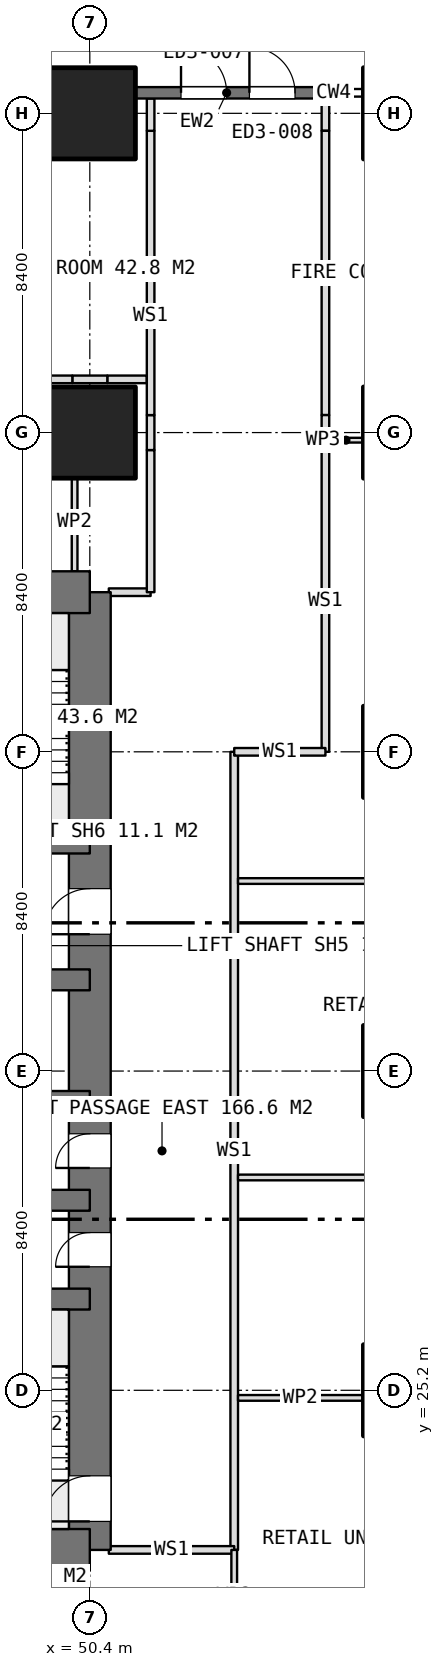
"""IFC4 building model, lengths in metres.
Left out: names, types, materials, properties, quantities, classifications, styles, units other than length and angle.
Written with IfcOpenShell. Run it as: python <this file> out.ifc"""

import sys

from ifc_helpers import new_model, si_unit, direction, frame, frame_2d, origin, origin_2d, place, context, subcontext, project, spatial, rectangle, extrude, element, fill, save


model = new_model("IFC4")
c1 = context("Model", 3, precision=1e-05, world=origin(), true_north=direction((0.0, 1.0)))
c2 = subcontext(c1, "Body", "Model", "MODEL_VIEW")
j1 = project(units=[si_unit("LENGTHUNIT", "METRE"), si_unit("PLANEANGLEUNIT", "RADIAN")], contexts=[c1])
p1 = place(None, origin())
s1 = spatial("IfcSite", under=j1, at=p1, CompositionType="ELEMENT")
p2 = place(p1, origin())
s2 = spatial("IfcBuilding", under=s1, at=p2, CompositionType="ELEMENT")
p3 = place(p2, origin())
s3 = spatial("IfcBuildingStorey", under=s2, at=p3, CompositionType="ELEMENT", Elevation=0.0)
for number, where, z_axis, x_axis in (
    (1, (40.0, 21.0, 0.0), (0.0, 0.0, 1.0), (1.0, 0.0, 0.0)),
    (2, (40.0, 46.2, 0.0), (0.0, 0.0, 1.0), (1.0, 0.0, 0.0)),
):
    element("IfcWall", number, at=place(p3, frame(where, z_axis=z_axis, x_axis=x_axis)), inside=s3, PredefinedType="SHEAR", context=c2, shape_type="SweptSolid", body=[
        extrude(rectangle(XDim=10.4, YDim=1.1, at=frame_2d((5.2, 0.0))), origin(), (0.0, 0.0, 1.0), 5.4),
    ])
p4 = place(p3, frame((50.4, 21.0, 0.0), z_axis=(0.0, 0.0, 1.0), x_axis=(0.0, 1.0, 0.0)))
e3 = element("IfcWall", 3, at=p4, inside=s3, PredefinedType="SHEAR", context=c2, shape_type="SweptSolid", body=[
    extrude(rectangle(XDim=25.2, YDim=1.1, at=frame_2d((12.6, 0.0))), origin(), (0.0, 0.0, 1.0), 5.4),
])
p5 = place(p4, frame((16.2, 0.0, 0.0)))
e4 = element("IfcOpeningElement", 4, at=p5, cuts=e3, PredefinedType="OPENING", context=c2, shape_type="SweptSolid", body=[
    extrude(rectangle(XDim=1.2, YDim=2.1, at=frame_2d((0.6, 1.05))), frame((0.0, 0.56, 0.0), z_axis=(0.0, -1.0, 0.0), x_axis=(1.0, 0.0, 0.0)), (0.0, 0.0, 1.0), 1.12),
])
p6 = place(p4, frame((10.05, 0.0, 0.0)))
e5 = element("IfcOpeningElement", 5, at=p6, cuts=e3, PredefinedType="OPENING", context=c2, shape_type="SweptSolid", body=[
    extrude(rectangle(XDim=0.9, YDim=2.1, at=frame_2d((0.45, 1.05))), frame((0.0, 0.56, 0.0), z_axis=(0.0, -1.0, 0.0), x_axis=(1.0, 0.0, 0.0)), (0.0, 0.0, 1.0), 1.12),
])
p7 = place(p4, frame((7.45, 0.0, 0.0)))
e6 = element("IfcOpeningElement", 6, at=p7, cuts=e3, PredefinedType="OPENING", context=c2, shape_type="SweptSolid", body=[
    extrude(rectangle(XDim=0.9, YDim=2.1, at=frame_2d((0.45, 1.05))), frame((0.0, 0.56, 0.0), z_axis=(0.0, -1.0, 0.0), x_axis=(1.0, 0.0, 0.0)), (0.0, 0.0, 1.0), 1.12),
])
p8 = place(p4, frame((0.75, 0.0, 0.0)))
e7 = element("IfcOpeningElement", 7, at=p8, cuts=e3, PredefinedType="OPENING", context=c2, shape_type="SweptSolid", body=[
    extrude(rectangle(XDim=1.2, YDim=2.1, at=frame_2d((0.6, 1.05))), frame((0.0, 0.56, 0.0), z_axis=(0.0, -1.0, 0.0), x_axis=(1.0, 0.0, 0.0)), (0.0, 0.0, 1.0), 1.12),
])
for number, where, z_axis, x_axis in (
    (8, (43.8, 27.6, 0.0), (0.0, 0.0, 1.0), (1.0, 0.0, 0.0)),
    (9, (43.8, 30.2, 0.0), (0.0, 0.0, 1.0), (1.0, 0.0, 0.0)),
    (10, (43.8, 32.8, 0.0), (0.0, 0.0, 1.0), (1.0, 0.0, 0.0)),
):
    element("IfcWall", number, at=place(p3, frame(where, z_axis=z_axis, x_axis=x_axis)), inside=s3, PredefinedType="SHEAR", context=c2, shape_type="SweptSolid", body=[
        extrude(rectangle(XDim=6.6, YDim=0.55, at=frame_2d((3.3, 0.0))), origin(), (0.0, 0.0, 1.0), 5.4),
    ])
p9 = place(p3, frame((43.8, 36.0, 0.0), z_axis=(0.0, 0.0, 1.0), x_axis=(1.0, 0.0, 0.0)))
e11 = element("IfcWall", 11, at=p9, inside=s3, PredefinedType="SHEAR", context=c2, shape_type="SweptSolid", body=[
    extrude(rectangle(XDim=6.6, YDim=0.55, at=frame_2d((3.3, 0.0))), origin(), (0.0, 0.0, 1.0), 5.4),
])
p10 = place(p9, frame((2.65, 0.0, 0.0)))
e12 = element("IfcOpeningElement", 12, at=p10, cuts=e11, PredefinedType="OPENING", context=c2, shape_type="SweptSolid", body=[
    extrude(rectangle(XDim=1.3, YDim=2.1, at=frame_2d((0.65, 1.05))), frame((0.0, 0.285, 0.0), z_axis=(0.0, -1.0, 0.0), x_axis=(1.0, 0.0, 0.0)), (0.0, 0.0, 1.0), 0.57),
])
p11 = place(p3, frame((43.8, 39.6, 0.0), z_axis=(0.0, 0.0, 1.0), x_axis=(1.0, 0.0, 0.0)))
e13 = element("IfcWall", 13, at=p11, inside=s3, PredefinedType="SHEAR", context=c2, shape_type="SweptSolid", body=[
    extrude(rectangle(XDim=6.6, YDim=0.55, at=frame_2d((3.3, 0.0))), origin(), (0.0, 0.0, 1.0), 5.4),
])
p12 = place(p11, frame((0.475, 0.0, 0.0)))
e14 = element("IfcOpeningElement", 14, at=p12, cuts=e13, PredefinedType="OPENING", context=c2, shape_type="SweptSolid", body=[
    extrude(rectangle(XDim=1.2, YDim=2.1, at=frame_2d((0.6, 1.05))), frame((0.0, 0.285, 0.0), z_axis=(0.0, -1.0, 0.0), x_axis=(1.0, 0.0, 0.0)), (0.0, 0.0, 1.0), 0.57),
])
for number, where, z_axis, x_axis in (
    (15, (50.4, 50.4, 0.0), (0.0, 0.0, 1.0), (1.0, 0.0, 0.0)),
    (16, (50.4, 58.8, 0.0), (0.0, 0.0, 1.0), (1.0, 0.0, 0.0)),
):
    element("IfcColumn", number, at=place(p3, frame(where, z_axis=z_axis, x_axis=x_axis)), inside=s3, PredefinedType="COLUMN", context=c2, shape_type="SweptSolid", body=[
        extrude(rectangle(XDim=2.4, YDim=2.4, at=origin_2d()), origin(), (0.0, 0.0, 1.0), 5.4),
    ])
p13 = place(p3, frame((51.601, 59.34, 0.0), z_axis=(0.0, 0.0, 1.0), x_axis=(1.0, 0.0, 0.0)))
e17 = element("IfcWall", 17, at=p13, inside=s3, PredefinedType="SOLIDWALL", context=c2, shape_type="SweptSolid", body=[
    extrude(rectangle(XDim=4.799, YDim=0.3, at=frame_2d((2.399, 0.0))), origin(), (0.0, 0.0, 1.0), 3.3),
])
p14 = place(p13, frame((2.999, 0.0, 0.0)))
e18 = element("IfcOpeningElement", 18, at=p14, cuts=e17, PredefinedType="OPENING", context=c2, shape_type="SweptSolid", body=[
    extrude(rectangle(XDim=1.2, YDim=2.4, at=frame_2d((0.6, 1.2))), frame((0.0, 0.16, 0.0), z_axis=(0.0, -1.0, 0.0), x_axis=(1.0, 0.0, 0.0)), (0.0, 0.0, 1.0), 0.32),
])
p15 = place(p13, frame((1.199, 0.0, 0.0)))
e19 = element("IfcOpeningElement", 19, at=p15, cuts=e17, PredefinedType="OPENING", context=c2, shape_type="SweptSolid", body=[
    extrude(rectangle(XDim=1.2, YDim=2.4, at=frame_2d((0.6, 1.2))), frame((0.0, 0.16, 0.0), z_axis=(0.0, -1.0, 0.0), x_axis=(1.0, 0.0, 0.0)), (0.0, 0.0, 1.0), 0.32),
])
p16 = place(p3, frame((40.325, 49.4, 0.0), z_axis=(0.0, 0.0, 1.0), x_axis=(1.0, 0.0, 0.0)))
e20 = element("IfcWall", 20, at=p16, inside=s3, PredefinedType="PARTITIONING", context=c2, shape_type="SweptSolid", body=[
    extrude(rectangle(XDim=9.75, YDim=0.15, at=frame_2d((4.875, 0.0))), origin(), (0.0, 0.0, 1.0), 5.1),
])
p17 = place(p16, frame((4.375, 0.0, 0.0)))
e21 = element("IfcOpeningElement", 21, at=p17, cuts=e20, PredefinedType="OPENING", context=c2, shape_type="SweptSolid", body=[
    extrude(rectangle(XDim=1.0, YDim=2.1, at=frame_2d((0.5, 1.05))), frame((0.0, 0.085, 0.0), z_axis=(0.0, -1.0, 0.0), x_axis=(1.0, 0.0, 0.0)), (0.0, 0.0, 1.0), 0.17),
])
for number, where, z_axis, x_axis in (
    (22, (50.0, 46.75, 0.0), (0.0, 0.0, 1.0), (0.0, 1.0, 0.0)),
    (23, (50.0, 17.875, 0.0), (0.0, 0.0, 1.0), (0.0, 1.0, 0.0)),
):
    element("IfcWall", number, at=place(p3, frame(where, z_axis=z_axis, x_axis=x_axis)), inside=s3, PredefinedType="PARTITIONING", context=c2, shape_type="SweptSolid", body=[
        extrude(rectangle(XDim=2.575, YDim=0.15, at=frame_2d((1.288, 0.0))), origin(), (0.0, 0.0, 1.0), 5.1),
    ])
p18 = place(p3, frame((52.0, 46.2, 0.0), z_axis=(0.0, 0.0, 1.0), x_axis=(0.0, 1.0, 0.0)))
e24 = element("IfcWall", 24, at=p18, inside=s3, PredefinedType="PARTITIONING", context=c2, shape_type="SweptSolid", body=[
    extrude(rectangle(XDim=3.74, YDim=0.2, at=frame_2d((1.87, 0.0))), origin(), (0.0, 0.0, 1.0), 5.1),
])
p19 = place(p3, frame((52.0, 49.94, 0.0), z_axis=(0.0, 0.0, 1.0), x_axis=(0.0, 1.0, 0.0)))
e25 = element("IfcWall", 25, at=p19, inside=s3, PredefinedType="PARTITIONING", context=c2, shape_type="SweptSolid", body=[
    extrude(rectangle(XDim=0.92, YDim=0.2, at=frame_2d((0.46, 0.0))), origin(), (0.0, 0.0, 1.0), 3.3),
])
p20 = place(p3, frame((52.0, 50.86, 0.0), z_axis=(0.0, 0.0, 1.0), x_axis=(0.0, 1.0, 0.0)))
e26 = element("IfcWall", 26, at=p20, inside=s3, PredefinedType="PARTITIONING", context=c2, shape_type="SweptSolid", body=[
    extrude(rectangle(XDim=7.48, YDim=0.2, at=frame_2d((3.74, 0.0))), origin(), (0.0, 0.0, 1.0), 5.1),
])
p21 = place(p3, frame((52.0, 58.34, 0.0), z_axis=(0.0, 0.0, 1.0), x_axis=(0.0, 1.0, 0.0)))
e27 = element("IfcWall", 27, at=p21, inside=s3, PredefinedType="PARTITIONING", context=c2, shape_type="SweptSolid", body=[
    extrude(rectangle(XDim=0.85, YDim=0.2, at=frame_2d((0.425, 0.0))), origin(), (0.0, 0.0, 1.0), 3.3),
])
p22 = place(p3, frame((56.6, 59.29, 0.0), z_axis=(0.0, 0.0, 1.0), x_axis=(0.0, -1.0, 0.0)))
e28 = element("IfcWall", 28, at=p22, inside=s3, PredefinedType="PARTITIONING", context=c2, shape_type="SweptSolid", body=[
    extrude(rectangle(XDim=0.95, YDim=0.2, at=frame_2d((0.475, 0.0))), origin(), (0.0, 0.0, 1.0), 3.3),
])
p23 = place(p3, frame((56.6, 58.34, 0.0), z_axis=(0.0, 0.0, 1.0), x_axis=(0.0, -1.0, 0.0)))
e29 = element("IfcWall", 29, at=p23, inside=s3, PredefinedType="PARTITIONING", context=c2, shape_type="SweptSolid", body=[
    extrude(rectangle(XDim=7.48, YDim=0.2, at=frame_2d((3.74, 0.0))), origin(), (0.0, 0.0, 1.0), 5.1),
])
p24 = place(p3, frame((56.6, 50.86, 0.0), z_axis=(0.0, 0.0, 1.0), x_axis=(0.0, -1.0, 0.0)))
e30 = element("IfcWall", 30, at=p24, inside=s3, PredefinedType="PARTITIONING", context=c2, shape_type="SweptSolid", body=[
    extrude(rectangle(XDim=0.92, YDim=0.2, at=frame_2d((0.46, 0.0))), origin(), (0.0, 0.0, 1.0), 3.3),
])
p25 = place(p3, frame((56.6, 49.94, 0.0), z_axis=(0.0, 0.0, 1.0), x_axis=(0.0, -1.0, 0.0)))
e31 = element("IfcWall", 31, at=p25, inside=s3, PredefinedType="PARTITIONING", context=c2, shape_type="SweptSolid", body=[
    extrude(rectangle(XDim=7.94, YDim=0.2, at=frame_2d((3.97, 0.0))), origin(), (0.0, 0.0, 1.0), 5.1),
])
p26 = place(p3, frame((56.6, 42.0, 0.0), z_axis=(0.0, 0.0, 1.0), x_axis=(-1.0, 0.0, 0.0)))
e32 = element("IfcWall", 32, at=p26, inside=s3, PredefinedType="PARTITIONING", context=c2, shape_type="SweptSolid", body=[
    extrude(rectangle(XDim=2.4, YDim=0.2, at=frame_2d((1.2, 0.0))), origin(), (0.0, 0.0, 1.0), 5.1),
])
p27 = place(p3, frame((54.2, 42.0, 0.0), z_axis=(0.0, 0.0, 1.0), x_axis=(0.0, -1.0, 0.0)))
e33 = element("IfcWall", 33, at=p27, inside=s3, PredefinedType="PARTITIONING", context=c2, shape_type="SweptSolid", body=[
    extrude(rectangle(XDim=21.0, YDim=0.2, at=frame_2d((10.5, 0.0))), origin(), (0.0, 0.0, 1.0), 5.1),
])
p28 = place(p3, frame((54.2, 21.0, 0.0), z_axis=(0.0, 0.0, 1.0), x_axis=(-1.0, 0.0, 0.0)))
e34 = element("IfcWall", 34, at=p28, inside=s3, PredefinedType="PARTITIONING", context=c2, shape_type="SweptSolid", body=[
    extrude(rectangle(XDim=3.3, YDim=0.2, at=frame_2d((1.65, 0.0))), origin(), (0.0, 0.0, 1.0), 5.1),
])
p29 = place(p3, frame((50.9, 46.2, 0.0), z_axis=(0.0, 0.0, 1.0), x_axis=(1.0, 0.0, 0.0)))
e35 = element("IfcWall", 35, at=p29, inside=s3, PredefinedType="PARTITIONING", context=c2, shape_type="SweptSolid", body=[
    extrude(rectangle(XDim=1.1, YDim=0.2, at=frame_2d((0.55, 0.0))), origin(), (0.0, 0.0, 1.0), 5.1),
])
p30 = place(p3, frame((57.58, 50.2, 0.0), z_axis=(0.0, 0.0, 1.0), x_axis=(-1.0, 0.0, 0.0)))
e36 = element("IfcWall", 36, at=p30, inside=s3, PredefinedType="PARTITIONING", context=c2, shape_type="SweptSolid", body=[
    extrude(rectangle(XDim=0.88, YDim=0.125, at=frame_2d((0.44, 0.0))), origin(), (0.0, 0.0, 1.0), 3.3),
])
p31 = place(p3, frame((54.2, 18.6, 0.0), z_axis=(0.0, 0.0, 1.0), x_axis=(0.0, 1.0, 0.0)))
e37 = element("IfcWall", 37, at=p31, inside=s3, PredefinedType="PARTITIONING", context=c2, shape_type="SweptSolid", body=[
    extrude(rectangle(XDim=2.4, YDim=0.15, at=frame_2d((1.2, 0.0))), origin(), (0.0, 0.0, 1.0), 5.1),
])
p32 = place(p3, frame((54.3, 25.0, 0.0), z_axis=(0.0, 0.0, 1.0), x_axis=(1.0, 0.0, 0.0)))
e38 = element("IfcWall", 38, at=p32, inside=s3, PredefinedType="PARTITIONING", context=c2, shape_type="SweptSolid", body=[
    extrude(rectangle(XDim=3.28, YDim=0.15, at=frame_2d((1.64, 0.0))), origin(), (0.0, 0.0, 1.0), 5.1),
])
for number, where, z_axis, x_axis in (
    (39, (58.34, 30.8, 0.0), (0.0, 0.0, 1.0), (-1.0, 0.0, 0.0)),
    (40, (54.3, 38.6, 0.0), (0.0, 0.0, 1.0), (1.0, 0.0, 0.0)),
):
    element("IfcWall", number, at=place(p3, frame(where, z_axis=z_axis, x_axis=x_axis)), inside=s3, PredefinedType="PARTITIONING", context=c2, shape_type="SweptSolid", body=[
        extrude(rectangle(XDim=4.04, YDim=0.15, at=frame_2d((2.02, 0.0))), origin(), (0.0, 0.0, 1.0), 5.1),
    ])
p33 = place(p3, frame((51.9, 51.8, 0.0), z_axis=(0.0, 0.0, 1.0), x_axis=(-1.0, 0.0, 0.0)))
e41 = element("IfcWall", 41, at=p33, inside=s3, PredefinedType="PARTITIONING", context=c2, shape_type="SweptSolid", body=[
    extrude(rectangle(XDim=1.04, YDim=0.2, at=frame_2d((0.52, 0.0))), origin(), (0.0, 0.0, 1.0), 5.1),
])
p34 = place(p3, frame((50.86, 51.8, 0.0), z_axis=(0.0, 0.0, 1.0), x_axis=(-1.0, 0.0, 0.0)))
e42 = element("IfcWall", 42, at=p34, inside=s3, PredefinedType="PARTITIONING", context=c2, shape_type="SweptSolid", body=[
    extrude(rectangle(XDim=0.92, YDim=0.2, at=frame_2d((0.46, 0.0))), origin(), (0.0, 0.0, 1.0), 3.3),
])
p35 = place(p3, frame((49.94, 51.8, 0.0), z_axis=(0.0, 0.0, 1.0), x_axis=(-1.0, 0.0, 0.0)))
e43 = element("IfcWall", 43, at=p35, inside=s3, PredefinedType="PARTITIONING", context=c2, shape_type="SweptSolid", body=[
    extrude(rectangle(XDim=4.14, YDim=0.2, at=frame_2d((2.07, 0.0))), origin(), (0.0, 0.0, 1.0), 5.1),
])
p36 = place(p35, frame((1.17, 0.0, 0.0)))
e44 = element("IfcOpeningElement", 44, at=p36, cuts=e43, PredefinedType="OPENING", context=c2, shape_type="SweptSolid", body=[
    extrude(rectangle(XDim=1.8, YDim=2.1, at=frame_2d((0.9, 1.05))), frame((0.0, 0.11, 0.0), z_axis=(0.0, -1.0, 0.0), x_axis=(1.0, 0.0, 0.0)), (0.0, 0.0, 1.0), 0.22),
])
p37 = place(p14, origin())
e45 = element("IfcDoor", 45, at=p37, inside=s3, OperationType="SINGLE_SWING_LEFT", PredefinedType="DOOR", context=c2, shape_type="SweptSolid", body=[
    extrude(rectangle(XDim=1.2, YDim=2.4, at=frame_2d((0.6, 1.2))), frame((0.0, 0.025, 0.0), z_axis=(0.0, -1.0, 0.0), x_axis=(1.0, 0.0, 0.0)), (0.0, 0.0, 1.0), 0.05),
])
fill(e18, e45)
p38 = place(p15, origin())
e46 = element("IfcDoor", 46, at=p38, inside=s3, OperationType="SINGLE_SWING_LEFT", PredefinedType="DOOR", context=c2, shape_type="SweptSolid", body=[
    extrude(rectangle(XDim=1.2, YDim=2.4, at=frame_2d((0.6, 1.2))), frame((0.0, 0.025, 0.0), z_axis=(0.0, -1.0, 0.0), x_axis=(1.0, 0.0, 0.0)), (0.0, 0.0, 1.0), 0.05),
])
fill(e19, e46)
p39 = place(p5, origin())
e47 = element("IfcDoor", 47, at=p39, inside=s3, OperationType="SINGLE_SWING_LEFT", PredefinedType="DOOR", context=c2, shape_type="SweptSolid", body=[
    extrude(rectangle(XDim=1.2, YDim=2.1, at=frame_2d((0.6, 1.05))), frame((0.0, 0.025, 0.0), z_axis=(0.0, -1.0, 0.0), x_axis=(1.0, 0.0, 0.0)), (0.0, 0.0, 1.0), 0.05),
])
fill(e4, e47)
p40 = place(p6, origin())
e48 = element("IfcDoor", 48, at=p40, inside=s3, OperationType="SINGLE_SWING_LEFT", PredefinedType="DOOR", context=c2, shape_type="SweptSolid", body=[
    extrude(rectangle(XDim=0.9, YDim=2.1, at=frame_2d((0.45, 1.05))), frame((0.0, 0.025, 0.0), z_axis=(0.0, -1.0, 0.0), x_axis=(1.0, 0.0, 0.0)), (0.0, 0.0, 1.0), 0.05),
])
fill(e5, e48)
p41 = place(p7, origin())
e49 = element("IfcDoor", 49, at=p41, inside=s3, OperationType="SINGLE_SWING_LEFT", PredefinedType="DOOR", context=c2, shape_type="SweptSolid", body=[
    extrude(rectangle(XDim=0.9, YDim=2.1, at=frame_2d((0.45, 1.05))), frame((0.0, 0.025, 0.0), z_axis=(0.0, -1.0, 0.0), x_axis=(1.0, 0.0, 0.0)), (0.0, 0.0, 1.0), 0.05),
])
fill(e6, e49)
p42 = place(p8, origin())
e50 = element("IfcDoor", 50, at=p42, inside=s3, OperationType="SINGLE_SWING_RIGHT", PredefinedType="DOOR", context=c2, shape_type="SweptSolid", body=[
    extrude(rectangle(XDim=1.2, YDim=2.1, at=frame_2d((0.6, 1.05))), frame((0.0, 0.025, 0.0), z_axis=(0.0, -1.0, 0.0), x_axis=(1.0, 0.0, 0.0)), (0.0, 0.0, 1.0), 0.05),
])
fill(e7, e50)
save(model, sys.argv[1])
